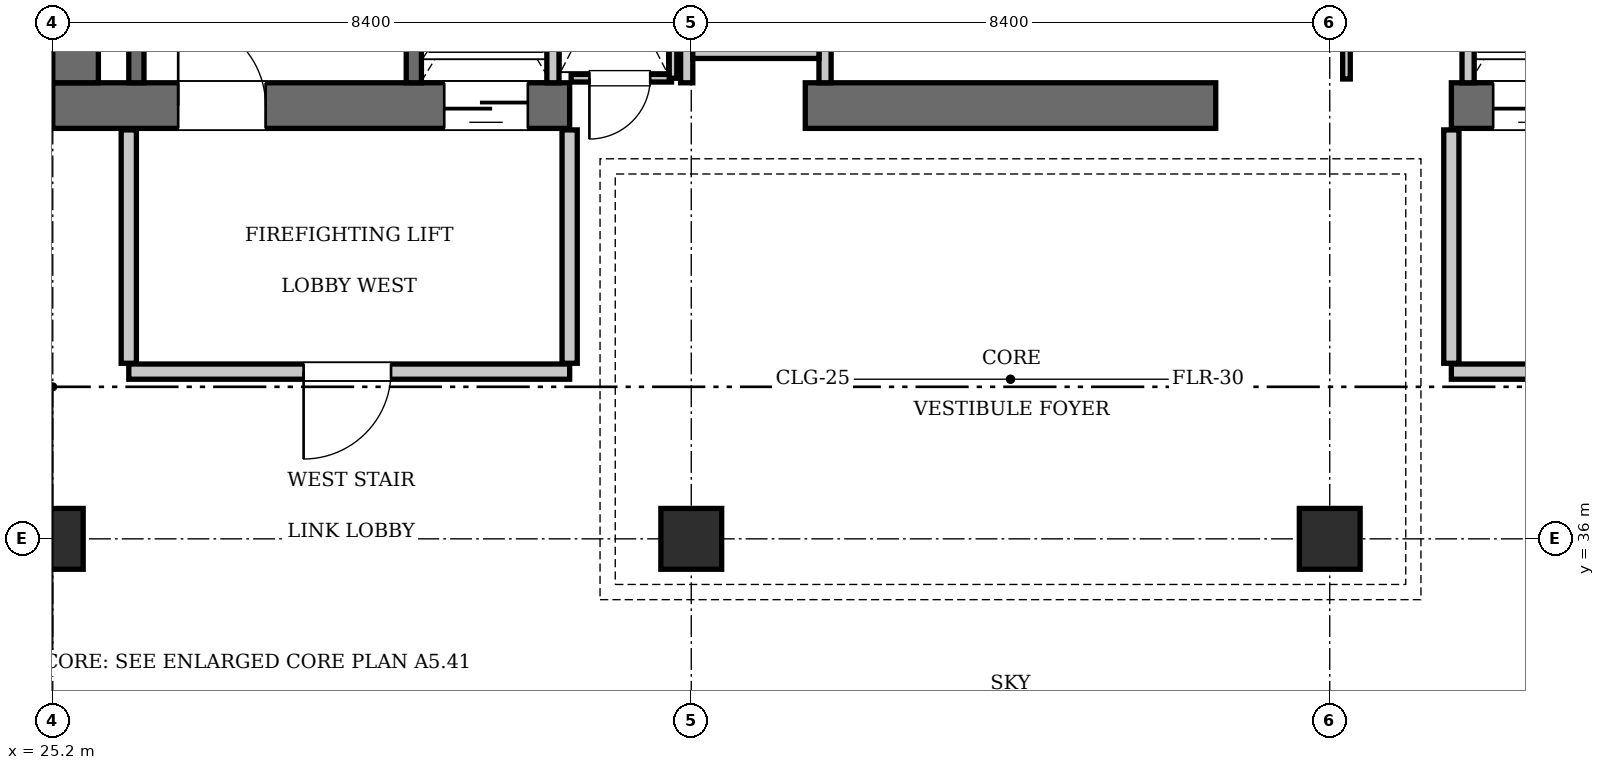
"""IFC4 building model, lengths in metres.
Left out: names, types, materials, properties, quantities, classifications, styles, units other than length and angle.
Written with IfcOpenShell. Run it as: python <this file> out.ifc"""

import sys

from ifc_helpers import new_model, si_unit, direction, frame, frame_2d, origin, origin_2d, place, context, subcontext, project, spatial, rectangle, extrude, element, fill, save


model = new_model("IFC4")
c1 = context("Model", 3, precision=1e-05, world=origin(), true_north=direction((0.0, 1.0)))
c2 = subcontext(c1, "Body", "Model", "MODEL_VIEW")
j1 = project(units=[si_unit("LENGTHUNIT", "METRE"), si_unit("PLANEANGLEUNIT", "RADIAN")], contexts=[c1])
p1 = place(None, origin())
s1 = spatial("IfcSite", under=j1, at=p1, CompositionType="ELEMENT")
p2 = place(p1, origin())
s2 = spatial("IfcBuilding", under=s1, at=p2, CompositionType="ELEMENT")
p3 = place(p2, frame((0.0, 0.0, 359.1)))
s3 = spatial("IfcBuildingStorey", under=s2, at=p3, CompositionType="ELEMENT", Elevation=359.1)
p4 = place(p3, frame((25.2, 41.7, 0.0), z_axis=(0.0, 0.0, 1.0), x_axis=(1.0, 0.0, 0.0)))
e1 = element("IfcWall", 1, at=p4, inside=s3, PredefinedType="SHEAR", context=c2, shape_type="SweptSolid", body=[
    extrude(rectangle(XDim=6.8, YDim=0.6, at=frame_2d((3.4, 0.0))), origin(), (0.0, 0.0, 1.0), 5.25),
])
p5 = place(p4, frame((1.65, 0.0, 0.0)))
e2 = element("IfcOpeningElement", 2, at=p5, cuts=e1, PredefinedType="OPENING", context=c2, shape_type="SweptSolid", body=[
    extrude(rectangle(XDim=1.15, YDim=2.15, at=frame_2d((0.575, 1.075))), frame((0.0, 0.31, 0.0), z_axis=(0.0, -1.0, 0.0), x_axis=(1.0, 0.0, 0.0)), (0.0, 0.0, 1.0), 0.62),
])
p6 = place(p4, frame((5.15, 0.0, 0.0)))
e3 = element("IfcOpeningElement", 3, at=p6, cuts=e1, PredefinedType="OPENING", context=c2, shape_type="SweptSolid", body=[
    extrude(rectangle(XDim=1.1, YDim=2.2, at=frame_2d((0.55, 1.1))), frame((0.0, 0.31, 0.0), z_axis=(0.0, -1.0, 0.0), x_axis=(1.0, 0.0, 0.0)), (0.0, 0.0, 1.0), 0.62),
])
p7 = place(p3, frame((35.1, 41.7, 0.0), z_axis=(0.0, 0.0, 1.0), x_axis=(1.0, 0.0, 0.0)))
e4 = element("IfcWall", 4, at=p7, inside=s3, PredefinedType="SHEAR", context=c2, shape_type="SweptSolid", body=[
    extrude(rectangle(XDim=5.4, YDim=0.6, at=frame_2d((2.7, 0.0))), origin(), (0.0, 0.0, 1.0), 5.25),
])
p8 = place(p3, frame((43.6, 41.7, 0.0), z_axis=(0.0, 0.0, 1.0), x_axis=(1.0, 0.0, 0.0)))
e5 = element("IfcWall", 5, at=p8, inside=s3, PredefinedType="SHEAR", context=c2, shape_type="SweptSolid", body=[
    extrude(rectangle(XDim=6.8, YDim=0.6, at=frame_2d((3.4, 0.0))), origin(), (0.0, 0.0, 1.0), 5.25),
])
p9 = place(p8, frame((3.9, 0.0, 0.0)))
e6 = element("IfcOpeningElement", 6, at=p9, cuts=e5, PredefinedType="OPENING", context=c2, shape_type="SweptSolid", body=[
    extrude(rectangle(XDim=1.15, YDim=2.15, at=frame_2d((0.575, 1.075))), frame((0.0, 0.31, 0.0), z_axis=(0.0, -1.0, 0.0), x_axis=(1.0, 0.0, 0.0)), (0.0, 0.0, 1.0), 0.62),
])
p10 = place(p8, frame((0.55, 0.0, 0.0)))
e7 = element("IfcOpeningElement", 7, at=p10, cuts=e5, PredefinedType="OPENING", context=c2, shape_type="SweptSolid", body=[
    extrude(rectangle(XDim=1.1, YDim=2.2, at=frame_2d((0.55, 1.1))), frame((0.0, 0.31, 0.0), z_axis=(0.0, -1.0, 0.0), x_axis=(1.0, 0.0, 0.0)), (0.0, 0.0, 1.0), 0.62),
])
p11 = place(p3, frame((25.5, 42.0, 0.0), z_axis=(0.0, 0.0, 1.0), x_axis=(0.0, 1.0, 0.0)))
e8 = element("IfcWall", 8, at=p11, inside=s3, PredefinedType="SHEAR", context=c2, shape_type="SweptSolid", body=[
    extrude(rectangle(XDim=2.325, YDim=0.6, at=frame_2d((1.163, 0.0))), origin(), (0.0, 0.0, 1.0), 5.25),
])
for number, where, z_axis, x_axis in (
    (9, (25.2, 36.0, 0.0), (0.0, 0.0, 1.0), (1.0, 0.0, 0.0)),
    (10, (33.6, 36.0, 0.0), (0.0, 0.0, 1.0), (1.0, 0.0, 0.0)),
    (11, (42.0, 36.0, 0.0), (0.0, 0.0, 1.0), (1.0, 0.0, 0.0)),
):
    element("IfcColumn", number, at=place(p3, frame(where, z_axis=z_axis, x_axis=x_axis)), inside=s3, PredefinedType="COLUMN", context=c2, shape_type="SweptSolid", body=[
        extrude(rectangle(XDim=0.8, YDim=0.8, at=origin_2d()), origin(), (0.0, 0.0, 1.0), 5.25),
    ])
p12 = place(p3, frame((29.95, 42.0, 0.0), z_axis=(0.0, 0.0, 1.0), x_axis=(0.0, 1.0, 0.0)))
e12 = element("IfcWall", 12, at=p12, inside=s3, PredefinedType="SOLIDWALL", context=c2, shape_type="SweptSolid", body=[
    extrude(rectangle(XDim=9.15, YDim=0.2, at=frame_2d((4.575, 0.0))), origin(), (0.0, 0.0, 1.0), 4.97),
])
p13 = place(p3, frame((26.3, 42.0, 0.0), z_axis=(0.0, 0.0, 1.0), x_axis=(0.0, 1.0, 0.0)))
e13 = element("IfcWall", 13, at=p13, inside=s3, PredefinedType="SOLIDWALL", context=c2, shape_type="SweptSolid", body=[
    extrude(rectangle(XDim=9.12, YDim=0.2, at=frame_2d((4.56, 0.0))), origin(), (0.0, 0.0, 1.0), 4.97),
])
for number, where, z_axis, x_axis in (
    (14, (31.78, 42.0, 0.0), (0.0, 0.0, 1.0), (0.0, 1.0, 0.0)),
    (15, (43.82, 42.0, 0.0), (0.0, 0.0, 1.0), (0.0, 1.0, 0.0)),
):
    element("IfcWall", number, at=place(p3, frame(where, z_axis=z_axis, x_axis=x_axis)), inside=s3, PredefinedType="SOLIDWALL", context=c2, shape_type="SweptSolid", body=[
        extrude(rectangle(XDim=2.74, YDim=0.16, at=frame_2d((1.37, 0.0))), origin(), (0.0, 0.0, 1.0), 4.97),
    ])
for number, where, z_axis, x_axis in (
    (16, (33.54, 42.0, 0.0), (0.0, 0.0, 1.0), (0.0, 1.0, 0.0)),
    (17, (35.36, 42.0, 0.0), (0.0, 0.0, 1.0), (0.0, 1.0, 0.0)),
):
    element("IfcWall", number, at=place(p3, frame(where, z_axis=z_axis, x_axis=x_axis)), inside=s3, PredefinedType="SOLIDWALL", context=c2, shape_type="SweptSolid", body=[
        extrude(rectangle(XDim=2.4, YDim=0.16, at=frame_2d((1.2, 0.0))), origin(), (0.0, 0.0, 1.0), 4.97),
    ])
p14 = place(p3, frame((33.62, 42.4, 0.0), z_axis=(0.0, 0.0, 1.0), x_axis=(1.0, 0.0, 0.0)))
e18 = element("IfcWall", 18, at=p14, inside=s3, PredefinedType="SOLIDWALL", context=c2, shape_type="SweptSolid", body=[
    extrude(rectangle(XDim=1.66, YDim=0.16, at=frame_2d((0.83, 0.0))), origin(), (0.0, 0.0, 1.0), 4.97),
])
p15 = place(p3, frame((26.2, 38.2, 0.0), z_axis=(0.0, 0.0, 1.0), x_axis=(1.0, 0.0, 0.0)))
e19 = element("IfcWall", 19, at=p15, inside=s3, PredefinedType="PARTITIONING", context=c2, shape_type="SweptSolid", body=[
    extrude(rectangle(XDim=5.8, YDim=0.2, at=frame_2d((2.9, 0.0))), origin(), (0.0, 0.0, 1.0), 4.97),
])
p16 = place(p15, frame((2.3, 0.0, 0.0)))
e20 = element("IfcOpeningElement", 20, at=p16, cuts=e19, PredefinedType="OPENING", context=c2, shape_type="SweptSolid", body=[
    extrude(rectangle(XDim=1.15, YDim=2.15, at=frame_2d((0.575, 1.075))), frame((0.0, 0.11, 0.0), z_axis=(0.0, -1.0, 0.0), x_axis=(1.0, 0.0, 0.0)), (0.0, 0.0, 1.0), 0.22),
])
for number, where, z_axis, x_axis in (
    (21, (26.2, 38.31, 0.0), (0.0, 0.0, 1.0), (0.0, 1.0, 0.0)),
    (22, (32.0, 38.31, 0.0), (0.0, 0.0, 1.0), (0.0, 1.0, 0.0)),
):
    element("IfcWall", number, at=place(p3, frame(where, z_axis=z_axis, x_axis=x_axis)), inside=s3, PredefinedType="PARTITIONING", context=c2, shape_type="SweptSolid", body=[
        extrude(rectangle(XDim=3.07, YDim=0.2, at=frame_2d((1.535, 0.0))), origin(), (0.0, 0.0, 1.0), 4.97),
    ])
p17 = place(p3, frame((43.6, 38.2, 0.0), z_axis=(0.0, 0.0, 1.0), x_axis=(1.0, 0.0, 0.0)))
e23 = element("IfcWall", 23, at=p17, inside=s3, PredefinedType="PARTITIONING", context=c2, shape_type="SweptSolid", body=[
    extrude(rectangle(XDim=5.8, YDim=0.2, at=frame_2d((2.9, 0.0))), origin(), (0.0, 0.0, 1.0), 4.97),
])
p18 = place(p17, frame((2.3, 0.0, 0.0)))
e24 = element("IfcOpeningElement", 24, at=p18, cuts=e23, PredefinedType="OPENING", context=c2, shape_type="SweptSolid", body=[
    extrude(rectangle(XDim=1.15, YDim=2.15, at=frame_2d((0.575, 1.075))), frame((0.0, 0.11, 0.0), z_axis=(0.0, -1.0, 0.0), x_axis=(1.0, 0.0, 0.0)), (0.0, 0.0, 1.0), 0.22),
])
p19 = place(p3, frame((43.6, 38.31, 0.0), z_axis=(0.0, 0.0, 1.0), x_axis=(0.0, 1.0, 0.0)))
e25 = element("IfcWall", 25, at=p19, inside=s3, PredefinedType="PARTITIONING", context=c2, shape_type="SweptSolid", body=[
    extrude(rectangle(XDim=3.07, YDim=0.2, at=frame_2d((1.535, 0.0))), origin(), (0.0, 0.0, 1.0), 4.97),
])
p20 = place(p3, frame((32.02, 42.06, 0.0), z_axis=(0.0, 0.0, 1.0), x_axis=(1.0, 0.0, 0.0)))
e26 = element("IfcWall", 26, at=p20, inside=s3, PredefinedType="PARTITIONING", context=c2, shape_type="SweptSolid", body=[
    extrude(rectangle(XDim=1.32, YDim=0.1, at=frame_2d((0.66, 0.0))), origin(), (0.0, 0.0, 1.0), 4.97),
])
p21 = place(p20, frame((0.24, 0.0, 0.0)))
e27 = element("IfcOpeningElement", 27, at=p21, cuts=e26, PredefinedType="OPENING", context=c2, shape_type="SweptSolid", body=[
    extrude(rectangle(XDim=0.8, YDim=2.05, at=frame_2d((0.4, 1.025))), frame((0.0, 0.06, 0.0), z_axis=(0.0, -1.0, 0.0), x_axis=(1.0, 0.0, 0.0)), (0.0, 0.0, 1.0), 0.12),
])
p22 = place(p3, frame((33.36, 42.06, 0.0), z_axis=(0.0, 0.0, 1.0), x_axis=(0.0, 1.0, 0.0)))
e28 = element("IfcWall", 28, at=p22, inside=s3, PredefinedType="PARTITIONING", context=c2, shape_type="SweptSolid", body=[
    extrude(rectangle(XDim=2.88, YDim=0.1, at=frame_2d((1.44, 0.0))), origin(), (0.0, 0.0, 1.0), 4.97),
])
p23 = place(p3, frame((42.22, 42.05, 0.0), z_axis=(0.0, 0.0, 1.0), x_axis=(0.0, 1.0, 0.0)))
e29 = element("IfcWall", 29, at=p23, inside=s3, PredefinedType="PARTITIONING", context=c2, shape_type="SweptSolid", body=[
    extrude(rectangle(XDim=2.91, YDim=0.1, at=frame_2d((1.455, 0.0))), origin(), (0.0, 0.0, 1.0), 4.97),
])
p24 = place(p23, frame((0.65, 0.0, 0.0)))
e30 = element("IfcOpeningElement", 30, at=p24, cuts=e29, PredefinedType="OPENING", context=c2, shape_type="SweptSolid", body=[
    extrude(rectangle(XDim=0.8, YDim=2.05, at=frame_2d((0.4, 1.025))), frame((0.0, 0.06, 0.0), z_axis=(0.0, -1.0, 0.0), x_axis=(1.0, 0.0, 0.0)), (0.0, 0.0, 1.0), 0.12),
])
p25 = place(p5, origin())
e31 = element("IfcDoor", 31, at=p25, inside=s3, OperationType="SINGLE_SWING_LEFT", PredefinedType="DOOR", context=c2, shape_type="SweptSolid", body=[
    extrude(rectangle(XDim=1.15, YDim=2.15, at=frame_2d((0.575, 1.075))), frame((0.0, 0.025, 0.0), z_axis=(0.0, -1.0, 0.0), x_axis=(1.0, 0.0, 0.0)), (0.0, 0.0, 1.0), 0.05),
])
fill(e2, e31)
p26 = place(p6, frame((1.1, 0.0, 0.0), z_axis=(0.0, 0.0, 1.0), x_axis=(-1.0, 0.0, 0.0)))
e32 = element("IfcDoor", 32, at=p26, inside=s3, OperationType="SLIDING_TO_LEFT", PredefinedType="DOOR", context=c2, shape_type="SweptSolid", body=[
    extrude(rectangle(XDim=1.1, YDim=2.2, at=frame_2d((0.55, 1.1))), frame((0.0, 0.025, 0.0), z_axis=(0.0, -1.0, 0.0), x_axis=(1.0, 0.0, 0.0)), (0.0, 0.0, 1.0), 0.05),
])
fill(e3, e32)
p27 = place(p10, frame((1.1, 0.0, 0.0), z_axis=(0.0, 0.0, 1.0), x_axis=(-1.0, 0.0, 0.0)))
e33 = element("IfcDoor", 33, at=p27, inside=s3, OperationType="SLIDING_TO_LEFT", PredefinedType="DOOR", context=c2, shape_type="SweptSolid", body=[
    extrude(rectangle(XDim=1.1, YDim=2.2, at=frame_2d((0.55, 1.1))), frame((0.0, 0.025, 0.0), z_axis=(0.0, -1.0, 0.0), x_axis=(1.0, 0.0, 0.0)), (0.0, 0.0, 1.0), 0.05),
])
fill(e7, e33)
p28 = place(p16, frame((1.15, 0.0, 0.0), z_axis=(0.0, 0.0, 1.0), x_axis=(-1.0, 0.0, 0.0)))
e34 = element("IfcDoor", 34, at=p28, inside=s3, OperationType="SINGLE_SWING_RIGHT", PredefinedType="DOOR", context=c2, shape_type="SweptSolid", body=[
    extrude(rectangle(XDim=1.15, YDim=2.15, at=frame_2d((0.575, 1.075))), frame((0.0, 0.025, 0.0), z_axis=(0.0, -1.0, 0.0), x_axis=(1.0, 0.0, 0.0)), (0.0, 0.0, 1.0), 0.05),
])
fill(e20, e34)
p29 = place(p21, frame((0.8, 0.0, 0.0), z_axis=(0.0, 0.0, 1.0), x_axis=(-1.0, 0.0, 0.0)))
e35 = element("IfcDoor", 35, at=p29, inside=s3, OperationType="SINGLE_SWING_RIGHT", PredefinedType="DOOR", context=c2, shape_type="SweptSolid", body=[
    extrude(rectangle(XDim=0.8, YDim=2.05, at=frame_2d((0.4, 1.025))), frame((0.0, 0.025, 0.0), z_axis=(0.0, -1.0, 0.0), x_axis=(1.0, 0.0, 0.0)), (0.0, 0.0, 1.0), 0.05),
])
fill(e27, e35)
save(model, sys.argv[1])
